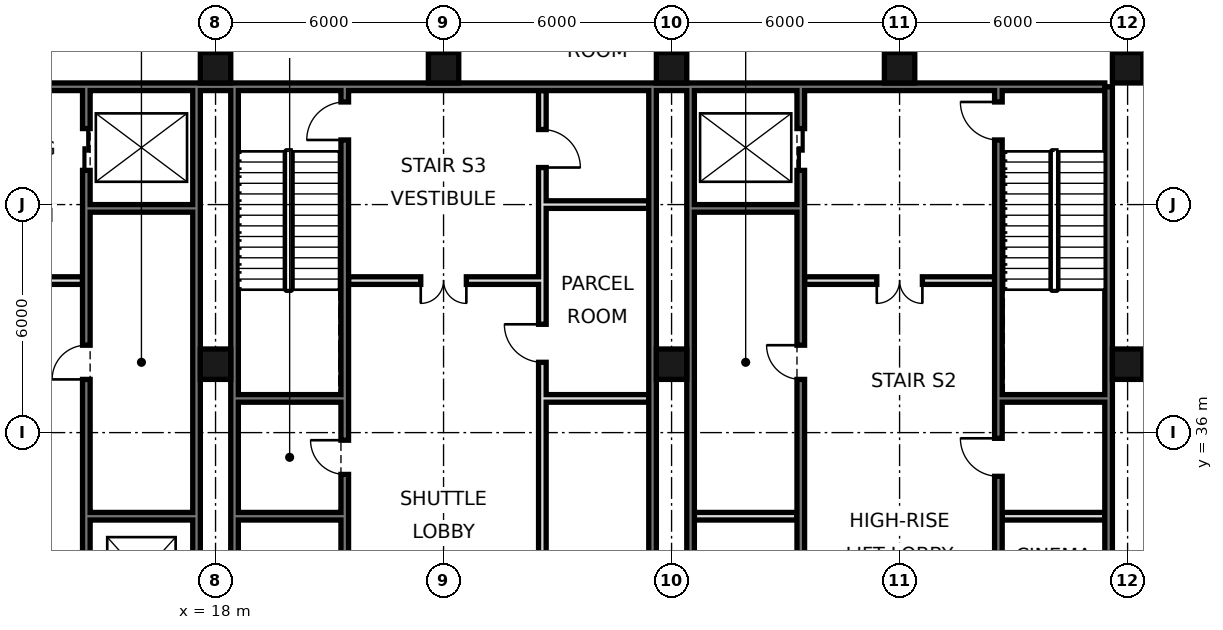
"""IFC4 building model, lengths in metres.
Left out: names, types, materials, properties, quantities, classifications, styles, units other than length and angle.
Written with IfcOpenShell. Run it as: python <this file> out.ifc"""

import sys

from ifc_helpers import new_model, si_unit, direction, frame, frame_2d, origin, origin_2d, place, context, subcontext, project, spatial, rectangle, hollow_rectangle, extrude, element, fill, save


model = new_model("IFC4")
c1 = context("Model", 3, precision=1e-05, world=origin(), true_north=direction((0.0, 1.0)))
c2 = subcontext(c1, "Body", "Model", "MODEL_VIEW")
j1 = project(units=[si_unit("LENGTHUNIT", "METRE"), si_unit("PLANEANGLEUNIT", "RADIAN")], contexts=[c1])
p1 = place(None, origin())
s1 = spatial("IfcSite", under=j1, at=p1, CompositionType="ELEMENT")
p2 = place(p1, origin())
s2 = spatial("IfcBuilding", under=s1, at=p2, CompositionType="ELEMENT")
p3 = place(p2, frame((0.0, 0.0, 20.4)))
s3 = spatial("IfcBuildingStorey", under=s2, at=p3, CompositionType="ELEMENT", Elevation=20.4)
for number, where, z_axis, x_axis in (
    (1, (18.0, 37.8, 0.0), (0.0, 0.0, 1.0), (1.0, 0.0, 0.0)),
    (2, (18.0, 45.6, 0.0), (0.0, 0.0, 1.0), (1.0, 0.0, 0.0)),
    (3, (24.0, 45.6, 0.0), (0.0, 0.0, 1.0), (1.0, 0.0, 0.0)),
    (4, (30.0, 37.8, 0.0), (0.0, 0.0, 1.0), (1.0, 0.0, 0.0)),
    (5, (30.0, 45.6, 0.0), (0.0, 0.0, 1.0), (1.0, 0.0, 0.0)),
    (6, (36.0, 45.6, 0.0), (0.0, 0.0, 1.0), (1.0, 0.0, 0.0)),
    (7, (42.0, 37.8, 0.0), (0.0, 0.0, 1.0), (1.0, 0.0, 0.0)),
    (8, (42.0, 45.6, 0.0), (0.0, 0.0, 1.0), (1.0, 0.0, 0.0)),
):
    element("IfcColumn", number, at=place(p3, frame(where, z_axis=z_axis, x_axis=x_axis)), inside=s3, PredefinedType="COLUMN", context=c2, shape_type="SweptSolid", body=[
        extrude(hollow_rectangle(XDim=0.8, YDim=0.8, WallThickness=0.07, at=origin_2d()), origin(), (0.0, 0.0, 1.0), 4.8),
    ])
p4 = place(p3, frame((41.5, 21.6, 0.0), z_axis=(0.0, 0.0, 1.0), x_axis=(0.0, 1.0, 0.0)))
e9 = element("IfcWall", 9, at=p4, inside=s3, PredefinedType="SOLIDWALL", context=c2, shape_type="SweptSolid", body=[
    extrude(rectangle(XDim=23.5, YDim=0.2, at=frame_2d((11.75, 0.0))), origin(), (0.0, 0.0, 1.0), 4.4),
])
p5 = place(p3, frame((6.6, 45.1, 0.0), z_axis=(0.0, 0.0, 1.0), x_axis=(1.0, 0.0, 0.0)))
e10 = element("IfcWall", 10, at=p5, inside=s3, PredefinedType="SOLIDWALL", context=c2, shape_type="SweptSolid", body=[
    extrude(rectangle(XDim=34.8, YDim=0.2, at=frame_2d((17.4, 0.0))), origin(), (0.0, 0.0, 1.0), 4.4),
])
for number, where, z_axis, x_axis in (
    (11, (17.5, 27.6, 0.0), (0.0, 0.0, 1.0), (0.0, 1.0, 0.0)),
    (12, (18.5, 27.6, 0.0), (0.0, 0.0, 1.0), (0.0, 1.0, 0.0)),
    (13, (29.5, 27.6, 0.0), (0.0, 0.0, 1.0), (0.0, 1.0, 0.0)),
    (14, (30.5, 27.6, 0.0), (0.0, 0.0, 1.0), (0.0, 1.0, 0.0)),
):
    element("IfcWall", number, at=place(p3, frame(where, z_axis=z_axis, x_axis=x_axis)), inside=s3, PredefinedType="SOLIDWALL", context=c2, shape_type="SweptSolid", body=[
        extrude(rectangle(XDim=17.5, YDim=0.2, at=frame_2d((8.75, 0.0))), origin(), (0.0, 0.0, 1.0), 4.4),
    ])
p6 = place(p3, frame((14.6, 27.5, 0.0), z_axis=(0.0, 0.0, 1.0), x_axis=(0.0, 1.0, 0.0)))
e15 = element("IfcWall", 15, at=p6, inside=s3, PredefinedType="SOLIDWALL", context=c2, shape_type="SweptSolid", body=[
    extrude(rectangle(XDim=17.5, YDim=0.2, at=frame_2d((8.75, 0.0))), origin(), (0.0, 0.0, 1.0), 4.4),
])
p7 = place(p6, frame((1.1, 0.0, 0.0)))
e16 = element("IfcOpeningElement", 16, at=p7, cuts=e15, PredefinedType="OPENING", context=c2, shape_type="SweptSolid", body=[
    extrude(rectangle(XDim=1.1, YDim=2.1, at=frame_2d((0.55, 1.05))), frame((0.0, 0.11, 0.0), z_axis=(0.0, -1.0, 0.0), x_axis=(1.0, 0.0, 0.0)), (0.0, 0.0, 1.0), 0.22),
])
p8 = place(p6, frame((4.2, 0.0, 0.0)))
e17 = element("IfcOpeningElement", 17, at=p8, cuts=e15, PredefinedType="OPENING", context=c2, shape_type="SweptSolid", body=[
    extrude(rectangle(XDim=1.1, YDim=2.1, at=frame_2d((0.55, 1.05))), frame((0.0, 0.11, 0.0), z_axis=(0.0, -1.0, 0.0), x_axis=(1.0, 0.0, 0.0)), (0.0, 0.0, 1.0), 0.22),
])
p9 = place(p6, frame((15.4, 0.0, 0.0)))
e18 = element("IfcOpeningElement", 18, at=p9, cuts=e15, PredefinedType="OPENING", context=c2, shape_type="SweptSolid", body=[
    extrude(rectangle(XDim=1.1, YDim=2.1, at=frame_2d((0.55, 1.05))), frame((0.0, 0.11, 0.0), z_axis=(0.0, -1.0, 0.0), x_axis=(1.0, 0.0, 0.0)), (0.0, 0.0, 1.0), 0.22),
])
p10 = place(p6, frame((9.9, 0.0, 0.0)))
e19 = element("IfcOpeningElement", 19, at=p10, cuts=e15, PredefinedType="OPENING", context=c2, shape_type="SweptSolid", body=[
    extrude(rectangle(XDim=0.9, YDim=2.1, at=frame_2d((0.45, 1.05))), frame((0.0, 0.11, 0.0), z_axis=(0.0, -1.0, 0.0), x_axis=(1.0, 0.0, 0.0)), (0.0, 0.0, 1.0), 0.22),
])
p11 = place(p3, frame((21.4, 27.5, 0.0), z_axis=(0.0, 0.0, 1.0), x_axis=(0.0, 1.0, 0.0)))
e20 = element("IfcWall", 20, at=p11, inside=s3, PredefinedType="SOLIDWALL", context=c2, shape_type="SweptSolid", body=[
    extrude(rectangle(XDim=17.5, YDim=0.2, at=frame_2d((8.75, 0.0))), origin(), (0.0, 0.0, 1.0), 4.4),
])
p12 = place(p11, frame((16.2, 0.0, 0.0)))
e21 = element("IfcOpeningElement", 21, at=p12, cuts=e20, PredefinedType="OPENING", context=c2, shape_type="SweptSolid", body=[
    extrude(rectangle(XDim=1.0, YDim=2.1, at=frame_2d((0.5, 1.05))), frame((0.0, 0.11, 0.0), z_axis=(0.0, -1.0, 0.0), x_axis=(1.0, 0.0, 0.0)), (0.0, 0.0, 1.0), 0.22),
])
p13 = place(p11, frame((7.4, 0.0, 0.0)))
e22 = element("IfcOpeningElement", 22, at=p13, cuts=e20, PredefinedType="OPENING", context=c2, shape_type="SweptSolid", body=[
    extrude(rectangle(XDim=0.9, YDim=2.1, at=frame_2d((0.45, 1.05))), frame((0.0, 0.11, 0.0), z_axis=(0.0, -1.0, 0.0), x_axis=(1.0, 0.0, 0.0)), (0.0, 0.0, 1.0), 0.22),
])
p14 = place(p3, frame((26.6, 27.5, 0.0), z_axis=(0.0, 0.0, 1.0), x_axis=(0.0, 1.0, 0.0)))
e23 = element("IfcWall", 23, at=p14, inside=s3, PredefinedType="SOLIDWALL", context=c2, shape_type="SweptSolid", body=[
    extrude(rectangle(XDim=17.5, YDim=0.2, at=frame_2d((8.75, 0.0))), origin(), (0.0, 0.0, 1.0), 4.4),
])
p15 = place(p14, frame((4.3, 0.0, 0.0)))
e24 = element("IfcOpeningElement", 24, at=p15, cuts=e23, PredefinedType="OPENING", context=c2, shape_type="SweptSolid", body=[
    extrude(rectangle(XDim=0.9, YDim=2.1, at=frame_2d((0.45, 1.05))), frame((0.0, 0.11, 0.0), z_axis=(0.0, -1.0, 0.0), x_axis=(1.0, 0.0, 0.0)), (0.0, 0.0, 1.0), 0.22),
])
p16 = place(p14, frame((10.35, 0.0, 0.0)))
e25 = element("IfcOpeningElement", 25, at=p16, cuts=e23, PredefinedType="OPENING", context=c2, shape_type="SweptSolid", body=[
    extrude(rectangle(XDim=1.0, YDim=2.1, at=frame_2d((0.5, 1.05))), frame((0.0, 0.11, 0.0), z_axis=(0.0, -1.0, 0.0), x_axis=(1.0, 0.0, 0.0)), (0.0, 0.0, 1.0), 0.22),
])
p17 = place(p14, frame((15.475, 0.0, 0.0)))
e26 = element("IfcOpeningElement", 26, at=p17, cuts=e23, PredefinedType="OPENING", context=c2, shape_type="SweptSolid", body=[
    extrude(rectangle(XDim=1.0, YDim=2.1, at=frame_2d((0.5, 1.05))), frame((0.0, 0.11, 0.0), z_axis=(0.0, -1.0, 0.0), x_axis=(1.0, 0.0, 0.0)), (0.0, 0.0, 1.0), 0.22),
])
p18 = place(p3, frame((33.4, 27.5, 0.0), z_axis=(0.0, 0.0, 1.0), x_axis=(0.0, 1.0, 0.0)))
e27 = element("IfcWall", 27, at=p18, inside=s3, PredefinedType="SOLIDWALL", context=c2, shape_type="SweptSolid", body=[
    extrude(rectangle(XDim=17.5, YDim=0.2, at=frame_2d((8.75, 0.0))), origin(), (0.0, 0.0, 1.0), 4.4),
])
p19 = place(p18, frame((15.4, 0.0, 0.0)))
e28 = element("IfcOpeningElement", 28, at=p19, cuts=e27, PredefinedType="OPENING", context=c2, shape_type="SweptSolid", body=[
    extrude(rectangle(XDim=1.1, YDim=2.1, at=frame_2d((0.55, 1.05))), frame((0.0, 0.11, 0.0), z_axis=(0.0, -1.0, 0.0), x_axis=(1.0, 0.0, 0.0)), (0.0, 0.0, 1.0), 0.22),
])
p20 = place(p18, frame((2.7, 0.0, 0.0)))
e29 = element("IfcOpeningElement", 29, at=p20, cuts=e27, PredefinedType="OPENING", context=c2, shape_type="SweptSolid", body=[
    extrude(rectangle(XDim=1.0, YDim=2.1, at=frame_2d((0.5, 1.05))), frame((0.0, 0.11, 0.0), z_axis=(0.0, -1.0, 0.0), x_axis=(1.0, 0.0, 0.0)), (0.0, 0.0, 1.0), 0.22),
])
p21 = place(p18, frame((9.9, 0.0, 0.0)))
e30 = element("IfcOpeningElement", 30, at=p21, cuts=e27, PredefinedType="OPENING", context=c2, shape_type="SweptSolid", body=[
    extrude(rectangle(XDim=0.9, YDim=2.1, at=frame_2d((0.45, 1.05))), frame((0.0, 0.11, 0.0), z_axis=(0.0, -1.0, 0.0), x_axis=(1.0, 0.0, 0.0)), (0.0, 0.0, 1.0), 0.22),
])
p22 = place(p3, frame((38.6, 21.6, 0.0), z_axis=(0.0, 0.0, 1.0), x_axis=(0.0, 1.0, 0.0)))
e31 = element("IfcWall", 31, at=p22, inside=s3, PredefinedType="SOLIDWALL", context=c2, shape_type="SweptSolid", body=[
    extrude(rectangle(XDim=23.4, YDim=0.2, at=frame_2d((11.7, 0.0))), origin(), (0.0, 0.0, 1.0), 4.4),
])
p23 = place(p22, frame((8.6, 0.0, 0.0)))
e32 = element("IfcOpeningElement", 32, at=p23, cuts=e31, PredefinedType="OPENING", context=c2, shape_type="SweptSolid", body=[
    extrude(rectangle(XDim=1.0, YDim=2.1, at=frame_2d((0.5, 1.05))), frame((0.0, 0.11, 0.0), z_axis=(0.0, -1.0, 0.0), x_axis=(1.0, 0.0, 0.0)), (0.0, 0.0, 1.0), 0.22),
])
p24 = place(p22, frame((13.25, 0.0, 0.0)))
e33 = element("IfcOpeningElement", 33, at=p24, cuts=e31, PredefinedType="OPENING", context=c2, shape_type="SweptSolid", body=[
    extrude(rectangle(XDim=1.0, YDim=2.1, at=frame_2d((0.5, 1.05))), frame((0.0, 0.11, 0.0), z_axis=(0.0, -1.0, 0.0), x_axis=(1.0, 0.0, 0.0)), (0.0, 0.0, 1.0), 0.22),
])
p25 = place(p22, frame((22.1, 0.0, 0.0)))
e34 = element("IfcOpeningElement", 34, at=p25, cuts=e31, PredefinedType="OPENING", context=c2, shape_type="SweptSolid", body=[
    extrude(rectangle(XDim=1.0, YDim=2.1, at=frame_2d((0.5, 1.05))), frame((0.0, 0.11, 0.0), z_axis=(0.0, -1.0, 0.0), x_axis=(1.0, 0.0, 0.0)), (0.0, 0.0, 1.0), 0.22),
])
p26 = place(p22, frame((0.175, 0.0, 0.0)))
e35 = element("IfcOpeningElement", 35, at=p26, cuts=e31, PredefinedType="OPENING", context=c2, shape_type="SweptSolid", body=[
    extrude(rectangle(XDim=0.9, YDim=2.1, at=frame_2d((0.45, 1.05))), frame((0.0, 0.11, 0.0), z_axis=(0.0, -1.0, 0.0), x_axis=(1.0, 0.0, 0.0)), (0.0, 0.0, 1.0), 0.22),
])
for number, where, z_axis, x_axis in (
    (36, (14.7, 33.8, 0.0), (0.0, 0.0, 1.0), (1.0, 0.0, 0.0)),
    (37, (18.6, 33.8, 0.0), (0.0, 0.0, 1.0), (1.0, 0.0, 0.0)),
    (38, (30.6, 33.8, 0.0), (0.0, 0.0, 1.0), (1.0, 0.0, 0.0)),
):
    element("IfcWall", number, at=place(p3, frame(where, z_axis=z_axis, x_axis=x_axis)), inside=s3, PredefinedType="SOLIDWALL", context=c2, shape_type="SweptSolid", body=[
        extrude(rectangle(XDim=2.7, YDim=0.2, at=frame_2d((1.35, 0.0))), origin(), (0.0, 0.0, 1.0), 4.4),
    ])
p27 = place(p3, frame((38.7, 33.8, 0.0), z_axis=(0.0, 0.0, 1.0), x_axis=(1.0, 0.0, 0.0)))
e39 = element("IfcWall", 39, at=p27, inside=s3, PredefinedType="PARTITIONING", context=c2, shape_type="SweptSolid", body=[
    extrude(rectangle(XDim=2.7, YDim=0.2, at=frame_2d((1.35, 0.0))), origin(), (0.0, 0.0, 1.0), 4.4),
])
for number, where, z_axis, x_axis in (
    (40, (18.6, 36.9, 0.0), (0.0, 0.0, 1.0), (1.0, 0.0, 0.0)),
    (41, (26.7, 36.9, 0.0), (0.0, 0.0, 1.0), (1.0, 0.0, 0.0)),
    (42, (38.7, 36.9, 0.0), (0.0, 0.0, 1.0), (1.0, 0.0, 0.0)),
):
    element("IfcWall", number, at=place(p3, frame(where, z_axis=z_axis, x_axis=x_axis)), inside=s3, PredefinedType="SOLIDWALL", context=c2, shape_type="SweptSolid", body=[
        extrude(rectangle(XDim=2.7, YDim=0.2, at=frame_2d((1.35, 0.0))), origin(), (0.0, 0.0, 1.0), 4.4),
    ])
p28 = place(p3, frame((21.5, 40.0, 0.0), z_axis=(0.0, 0.0, 1.0), x_axis=(1.0, 0.0, 0.0)))
e43 = element("IfcWall", 43, at=p28, inside=s3, PredefinedType="PARTITIONING", context=c2, shape_type="SweptSolid", body=[
    extrude(rectangle(XDim=5.0, YDim=0.2, at=frame_2d((2.5, 0.0))), origin(), (0.0, 0.0, 1.0), 4.4),
])
p29 = place(p28, frame((1.9, 0.0, 0.0)))
e44 = element("IfcOpeningElement", 44, at=p29, cuts=e43, PredefinedType="OPENING", context=c2, shape_type="SweptSolid", body=[
    extrude(rectangle(XDim=1.2, YDim=2.1, at=frame_2d((0.6, 1.05))), frame((0.0, 0.11, 0.0), z_axis=(0.0, -1.0, 0.0), x_axis=(1.0, 0.0, 0.0)), (0.0, 0.0, 1.0), 0.22),
])
p30 = place(p3, frame((33.5, 40.0, 0.0), z_axis=(0.0, 0.0, 1.0), x_axis=(1.0, 0.0, 0.0)))
e45 = element("IfcWall", 45, at=p30, inside=s3, PredefinedType="PARTITIONING", context=c2, shape_type="SweptSolid", body=[
    extrude(rectangle(XDim=5.0, YDim=0.2, at=frame_2d((2.5, 0.0))), origin(), (0.0, 0.0, 1.0), 4.4),
])
p31 = place(p30, frame((1.9, 0.0, 0.0)))
e46 = element("IfcOpeningElement", 46, at=p31, cuts=e45, PredefinedType="OPENING", context=c2, shape_type="SweptSolid", body=[
    extrude(rectangle(XDim=1.2, YDim=2.1, at=frame_2d((0.6, 1.05))), frame((0.0, 0.11, 0.0), z_axis=(0.0, -1.0, 0.0), x_axis=(1.0, 0.0, 0.0)), (0.0, 0.0, 1.0), 0.22),
])
p32 = place(p3, frame((9.5, 40.0, 0.0), z_axis=(0.0, 0.0, 1.0), x_axis=(1.0, 0.0, 0.0)))
e47 = element("IfcWall", 47, at=p32, inside=s3, PredefinedType="PARTITIONING", context=c2, shape_type="SweptSolid", body=[
    extrude(rectangle(XDim=5.0, YDim=0.2, at=frame_2d((2.5, 0.0))), origin(), (0.0, 0.0, 1.0), 4.4),
])
p33 = place(p32, frame((1.9, 0.0, 0.0)))
e48 = element("IfcOpeningElement", 48, at=p33, cuts=e47, PredefinedType="OPENING", context=c2, shape_type="SweptSolid", body=[
    extrude(rectangle(XDim=1.2, YDim=2.1, at=frame_2d((0.6, 1.05))), frame((0.0, 0.11, 0.0), z_axis=(0.0, -1.0, 0.0), x_axis=(1.0, 0.0, 0.0)), (0.0, 0.0, 1.0), 0.22),
])
for number, where, z_axis, x_axis in (
    (49, (14.7, 41.9, 0.0), (0.0, 0.0, 1.0), (1.0, 0.0, 0.0)),
    (50, (30.6, 41.9, 0.0), (0.0, 0.0, 1.0), (1.0, 0.0, 0.0)),
):
    element("IfcWall", number, at=place(p3, frame(where, z_axis=z_axis, x_axis=x_axis)), inside=s3, PredefinedType="SOLIDWALL", context=c2, shape_type="SweptSolid", body=[
        extrude(rectangle(XDim=2.7, YDim=0.2, at=frame_2d((1.35, 0.0))), origin(), (0.0, 0.0, 1.0), 4.4),
    ])
p34 = place(p3, frame((26.7, 42.0, 0.0), z_axis=(0.0, 0.0, 1.0), x_axis=(1.0, 0.0, 0.0)))
e51 = element("IfcWall", 51, at=p34, inside=s3, PredefinedType="PARTITIONING", context=c2, shape_type="SweptSolid", body=[
    extrude(rectangle(XDim=2.7, YDim=0.2, at=frame_2d((1.35, 0.0))), origin(), (0.0, 0.0, 1.0), 4.4),
])
p35 = place(p29, frame((1.2, 0.0, 0.0), z_axis=(0.0, 0.0, 1.0), x_axis=(-1.0, 0.0, 0.0)))
e52 = element("IfcDoor", 52, at=p35, inside=s3, OperationType="DOUBLE_DOOR_SINGLE_SWING", PredefinedType="DOOR", context=c2, shape_type="SweptSolid", body=[
    extrude(rectangle(XDim=1.2, YDim=2.1, at=frame_2d((0.6, 1.05))), frame((0.0, 0.025, 0.0), z_axis=(0.0, -1.0, 0.0), x_axis=(1.0, 0.0, 0.0)), (0.0, 0.0, 1.0), 0.05),
])
fill(e44, e52)
p36 = place(p31, frame((1.2, 0.0, 0.0), z_axis=(0.0, 0.0, 1.0), x_axis=(-1.0, 0.0, 0.0)))
e53 = element("IfcDoor", 53, at=p36, inside=s3, OperationType="DOUBLE_DOOR_SINGLE_SWING", PredefinedType="DOOR", context=c2, shape_type="SweptSolid", body=[
    extrude(rectangle(XDim=1.2, YDim=2.1, at=frame_2d((0.6, 1.05))), frame((0.0, 0.025, 0.0), z_axis=(0.0, -1.0, 0.0), x_axis=(1.0, 0.0, 0.0)), (0.0, 0.0, 1.0), 0.05),
])
fill(e46, e53)
p37 = place(p19, origin())
e54 = element("IfcDoor", 54, at=p37, inside=s3, OperationType="DOUBLE_DOOR_SLIDING", PredefinedType="DOOR", context=c2, shape_type="SweptSolid", body=[
    extrude(rectangle(XDim=1.1, YDim=2.1, at=frame_2d((0.55, 1.05))), frame((0.0, 0.025, 0.0), z_axis=(0.0, -1.0, 0.0), x_axis=(1.0, 0.0, 0.0)), (0.0, 0.0, 1.0), 0.05),
])
fill(e28, e54)
p38 = place(p9, origin())
e55 = element("IfcDoor", 55, at=p38, inside=s3, OperationType="DOUBLE_DOOR_SLIDING", PredefinedType="DOOR", context=c2, shape_type="SweptSolid", body=[
    extrude(rectangle(XDim=1.1, YDim=2.1, at=frame_2d((0.55, 1.05))), frame((0.0, 0.025, 0.0), z_axis=(0.0, -1.0, 0.0), x_axis=(1.0, 0.0, 0.0)), (0.0, 0.0, 1.0), 0.05),
])
fill(e18, e55)
p39 = place(p24, frame((1.0, 0.0, 0.0), z_axis=(0.0, 0.0, 1.0), x_axis=(-1.0, 0.0, 0.0)))
e56 = element("IfcDoor", 56, at=p39, inside=s3, OperationType="SINGLE_SWING_LEFT", PredefinedType="DOOR", context=c2, shape_type="SweptSolid", body=[
    extrude(rectangle(XDim=1.0, YDim=2.1, at=frame_2d((0.5, 1.05))), frame((0.0, 0.025, 0.0), z_axis=(0.0, -1.0, 0.0), x_axis=(1.0, 0.0, 0.0)), (0.0, 0.0, 1.0), 0.05),
])
fill(e33, e56)
p40 = place(p25, frame((1.0, 0.0, 0.0), z_axis=(0.0, 0.0, 1.0), x_axis=(-1.0, 0.0, 0.0)))
e57 = element("IfcDoor", 57, at=p40, inside=s3, OperationType="SINGLE_SWING_LEFT", PredefinedType="DOOR", context=c2, shape_type="SweptSolid", body=[
    extrude(rectangle(XDim=1.0, YDim=2.1, at=frame_2d((0.5, 1.05))), frame((0.0, 0.025, 0.0), z_axis=(0.0, -1.0, 0.0), x_axis=(1.0, 0.0, 0.0)), (0.0, 0.0, 1.0), 0.05),
])
fill(e34, e57)
p41 = place(p12, origin())
e58 = element("IfcDoor", 58, at=p41, inside=s3, OperationType="SINGLE_SWING_LEFT", PredefinedType="DOOR", context=c2, shape_type="SweptSolid", body=[
    extrude(rectangle(XDim=1.0, YDim=2.1, at=frame_2d((0.5, 1.05))), frame((0.0, 0.025, 0.0), z_axis=(0.0, -1.0, 0.0), x_axis=(1.0, 0.0, 0.0)), (0.0, 0.0, 1.0), 0.05),
])
fill(e21, e58)
p42 = place(p10, origin())
e59 = element("IfcDoor", 59, at=p42, inside=s3, OperationType="SINGLE_SWING_LEFT", PredefinedType="DOOR", context=c2, shape_type="SweptSolid", body=[
    extrude(rectangle(XDim=0.9, YDim=2.1, at=frame_2d((0.45, 1.05))), frame((0.0, 0.025, 0.0), z_axis=(0.0, -1.0, 0.0), x_axis=(1.0, 0.0, 0.0)), (0.0, 0.0, 1.0), 0.05),
])
fill(e19, e59)
p43 = place(p21, frame((0.9, 0.0, 0.0), z_axis=(0.0, 0.0, 1.0), x_axis=(-1.0, 0.0, 0.0)))
e60 = element("IfcDoor", 60, at=p43, inside=s3, OperationType="SINGLE_SWING_LEFT", PredefinedType="DOOR", context=c2, shape_type="SweptSolid", body=[
    extrude(rectangle(XDim=0.9, YDim=2.1, at=frame_2d((0.45, 1.05))), frame((0.0, 0.025, 0.0), z_axis=(0.0, -1.0, 0.0), x_axis=(1.0, 0.0, 0.0)), (0.0, 0.0, 1.0), 0.05),
])
fill(e30, e60)
p44 = place(p13, frame((0.9, 0.0, 0.0), z_axis=(0.0, 0.0, 1.0), x_axis=(-1.0, 0.0, 0.0)))
e61 = element("IfcDoor", 61, at=p44, inside=s3, OperationType="SINGLE_SWING_LEFT", PredefinedType="DOOR", context=c2, shape_type="SweptSolid", body=[
    extrude(rectangle(XDim=0.9, YDim=2.1, at=frame_2d((0.45, 1.05))), frame((0.0, 0.025, 0.0), z_axis=(0.0, -1.0, 0.0), x_axis=(1.0, 0.0, 0.0)), (0.0, 0.0, 1.0), 0.05),
])
fill(e22, e61)
p45 = place(p16, frame((1.0, 0.0, 0.0), z_axis=(0.0, 0.0, 1.0), x_axis=(-1.0, 0.0, 0.0)))
e62 = element("IfcDoor", 62, at=p45, inside=s3, OperationType="SINGLE_SWING_LEFT", PredefinedType="DOOR", context=c2, shape_type="SweptSolid", body=[
    extrude(rectangle(XDim=1.0, YDim=2.1, at=frame_2d((0.5, 1.05))), frame((0.0, 0.025, 0.0), z_axis=(0.0, -1.0, 0.0), x_axis=(1.0, 0.0, 0.0)), (0.0, 0.0, 1.0), 0.05),
])
fill(e25, e62)
p46 = place(p17, frame((1.0, 0.0, 0.0), z_axis=(0.0, 0.0, 1.0), x_axis=(-1.0, 0.0, 0.0)))
e63 = element("IfcDoor", 63, at=p46, inside=s3, OperationType="SINGLE_SWING_RIGHT", PredefinedType="DOOR", context=c2, shape_type="SweptSolid", body=[
    extrude(rectangle(XDim=1.0, YDim=2.1, at=frame_2d((0.5, 1.05))), frame((0.0, 0.025, 0.0), z_axis=(0.0, -1.0, 0.0), x_axis=(1.0, 0.0, 0.0)), (0.0, 0.0, 1.0), 0.05),
])
fill(e26, e63)
save(model, sys.argv[1])
